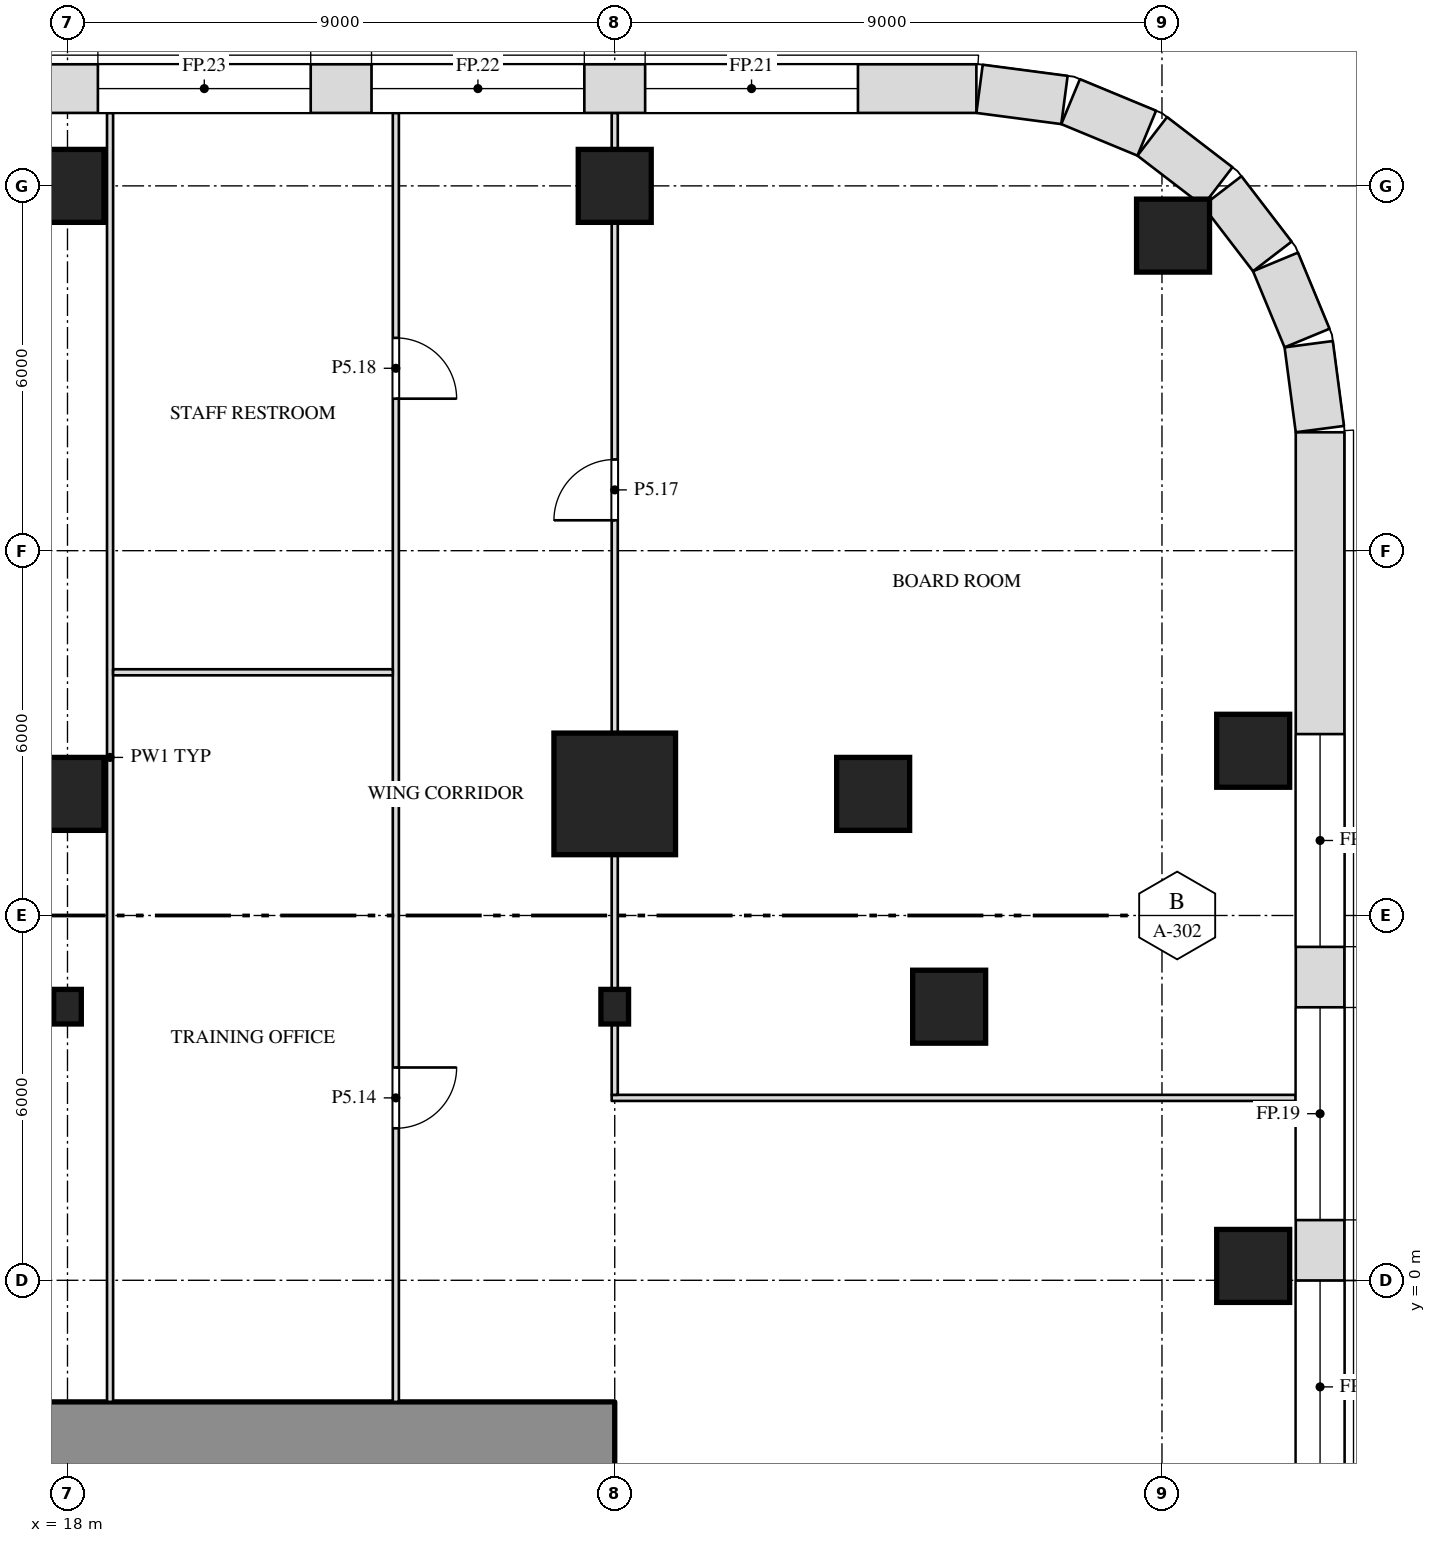
"""IFC4 building model, lengths in metres.
Left out: names, types, materials, properties, quantities, classifications, styles, units other than length and angle.
Written with IfcOpenShell. Run it as: python <this file> out.ifc"""

import sys

from ifc_helpers import new_model, si_unit, direction, frame, frame_2d, origin, origin_2d, place, context, subcontext, project, spatial, rectangle, i_section, extrude, element, fill, save


model = new_model("IFC4")
c1 = context("Model", 3, precision=1e-05, world=origin(), true_north=direction((0.0, 1.0)))
c2 = subcontext(c1, "Body", "Model", "MODEL_VIEW")
j1 = project(units=[si_unit("LENGTHUNIT", "METRE"), si_unit("PLANEANGLEUNIT", "RADIAN")], contexts=[c1])
p1 = place(None, origin())
s1 = spatial("IfcSite", under=j1, at=p1, CompositionType="ELEMENT")
p2 = place(p1, origin())
s2 = spatial("IfcBuilding", under=s1, at=p2, CompositionType="ELEMENT")
p3 = place(p2, frame((0.0, 0.0, 33.0)))
s3 = spatial("IfcBuildingStorey", under=s2, at=p3, CompositionType="ELEMENT", Elevation=33.0)
p4 = place(p3, frame((37.5, 0.236, 0.0), z_axis=(0.0, 0.0, 1.0), x_axis=(1.0, 0.0, 0.0)))
e1 = element("IfcColumn", 1, at=p4, inside=s3, PredefinedType="COLUMN", context=c2, shape_type="SweptSolid", body=[
    extrude(rectangle(XDim=1.2, YDim=1.2, at=origin_2d()), origin(), (0.0, 0.0, 1.0), 6.0),
])
for number, where, z_axis, x_axis in (
    (2, (18.0, 4.5, 0.0), (0.0, 0.0, 1.0), (1.0, 0.0, 0.0)),
    (3, (27.0, 4.5, 0.0), (0.0, 0.0, 1.0), (1.0, 0.0, 0.0)),
):
    element("IfcColumn", number, at=place(p3, frame(where, z_axis=z_axis, x_axis=x_axis)), inside=s3, PredefinedType="COLUMN", context=c2, shape_type="SweptSolid", body=[
        extrude(i_section(OverallWidth=0.455, OverallDepth=0.569, WebThickness=0.078, FlangeThickness=0.125, at=origin_2d()), origin(), (0.0, 0.0, 1.0), 6.0),
    ])
for number, where, z_axis, x_axis in (
    (4, (32.5, 4.5, 0.0), (0.0, 0.0, 1.0), (1.0, 0.0, 0.0)),
    (5, (18.0, 8.0, 0.0), (0.0, 0.0, 1.0), (1.0, 0.0, 0.0)),
):
    element("IfcColumn", number, at=place(p3, frame(where, z_axis=z_axis, x_axis=x_axis)), inside=s3, PredefinedType="COLUMN", context=c2, shape_type="SweptSolid", body=[
        extrude(rectangle(XDim=1.2, YDim=1.2, at=origin_2d()), origin(), (0.0, 0.0, 1.0), 6.0),
    ])
p5 = place(p3, frame((27.0, 8.0, 0.0), z_axis=(0.0, 0.0, 1.0), x_axis=(1.0, 0.0, 0.0)))
e6 = element("IfcColumn", 6, at=p5, inside=s3, PredefinedType="COLUMN", context=c2, shape_type="SweptSolid", body=[
    extrude(rectangle(XDim=2.0, YDim=2.0, at=origin_2d()), origin(), (0.0, 0.0, 1.0), 6.0),
])
for number, where, z_axis, x_axis in (
    (7, (31.25, 8.0, 0.0), (0.0, 0.0, 1.0), (1.0, 0.0, 0.0)),
    (8, (37.5, 8.709, 0.0), (0.0, 0.0, 1.0), (1.0, 0.0, 0.0)),
    (9, (36.182, 17.182, 0.0), (0.0, 0.0, 1.0), (1.0, 0.0, 0.0)),
    (10, (18.0, 18.0, 0.0), (0.0, 0.0, 1.0), (1.0, 0.0, 0.0)),
    (11, (27.0, 18.0, 0.0), (0.0, 0.0, 1.0), (1.0, 0.0, 0.0)),
):
    element("IfcColumn", number, at=place(p3, frame(where, z_axis=z_axis, x_axis=x_axis)), inside=s3, PredefinedType="COLUMN", context=c2, shape_type="SweptSolid", body=[
        extrude(rectangle(XDim=1.2, YDim=1.2, at=origin_2d()), origin(), (0.0, 0.0, 1.0), 6.0),
    ])
p6 = place(p3, frame((-27.0, -2.6, 0.0), z_axis=(0.0, 0.0, 1.0), x_axis=(1.0, 0.0, 0.0)))
e12 = element("IfcWall", 12, at=p6, inside=s3, PredefinedType="SHEAR", context=c2, shape_type="SweptSolid", body=[
    extrude(rectangle(XDim=54.0, YDim=1.2, at=frame_2d((27.0, 0.0))), origin(), (0.0, 0.0, 1.0), 5.75),
])
p7 = place(p3, frame((18.7, -2.0, 0.0), z_axis=(0.0, 0.0, 1.0), x_axis=(0.0, 1.0, 0.0)))
e13 = element("IfcWall", 13, at=p7, inside=s3, PredefinedType="PARTITIONING", context=c2, shape_type="SweptSolid", body=[
    extrude(rectangle(XDim=21.2, YDim=0.1, at=frame_2d((10.6, 0.0))), origin(), (0.0, 0.0, 1.0), 5.75),
])
p8 = place(p3, frame((23.4, -2.0, 0.0), z_axis=(0.0, 0.0, 1.0), x_axis=(0.0, 1.0, 0.0)))
e14 = element("IfcWall", 14, at=p8, inside=s3, PredefinedType="PARTITIONING", context=c2, shape_type="SweptSolid", body=[
    extrude(rectangle(XDim=21.2, YDim=0.1, at=frame_2d((10.6, 0.0))), origin(), (0.0, 0.0, 1.0), 5.75),
])
p9 = place(p8, frame((4.5, 0.0, 0.0)))
e15 = element("IfcOpeningElement", 15, at=p9, cuts=e14, PredefinedType="OPENING", context=c2, shape_type="SweptSolid", body=[
    extrude(rectangle(XDim=1.0, YDim=2.1, at=frame_2d((0.5, 1.05))), frame((0.0, 0.062, 0.0), z_axis=(0.0, -1.0, 0.0), x_axis=(1.0, 0.0, 0.0)), (0.0, 0.0, 1.0), 0.124),
])
p10 = place(p8, frame((16.5, 0.0, 0.0)))
e16 = element("IfcOpeningElement", 16, at=p10, cuts=e14, PredefinedType="OPENING", context=c2, shape_type="SweptSolid", body=[
    extrude(rectangle(XDim=1.0, YDim=2.1, at=frame_2d((0.5, 1.05))), frame((0.0, 0.062, 0.0), z_axis=(0.0, -1.0, 0.0), x_axis=(1.0, 0.0, 0.0)), (0.0, 0.0, 1.0), 0.124),
])
p11 = place(p3, frame((26.95, 3.0, 0.0), z_axis=(0.0, 0.0, 1.0), x_axis=(1.0, 0.0, 0.0)))
e17 = element("IfcWall", 17, at=p11, inside=s3, PredefinedType="PARTITIONING", context=c2, shape_type="SweptSolid", body=[
    extrude(rectangle(XDim=11.25, YDim=0.1, at=frame_2d((5.625, 0.0))), origin(), (0.0, 0.0, 1.0), 5.75),
])
p12 = place(p3, frame((27.0, 3.05, 0.0), z_axis=(0.0, 0.0, 1.0), x_axis=(0.0, 1.0, 0.0)))
e18 = element("IfcWall", 18, at=p12, inside=s3, PredefinedType="PARTITIONING", context=c2, shape_type="SweptSolid", body=[
    extrude(rectangle(XDim=1.166, YDim=0.1, at=frame_2d((0.583, 0.0))), origin(), (0.0, 0.0, 1.0), 5.138),
])
p13 = place(p3, frame((27.0, 4.784, 0.0), z_axis=(0.0, 0.0, 1.0), x_axis=(0.0, 1.0, 0.0)))
e19 = element("IfcWall", 19, at=p13, inside=s3, PredefinedType="PARTITIONING", context=c2, shape_type="SweptSolid", body=[
    extrude(rectangle(XDim=2.216, YDim=0.1, at=frame_2d((1.108, 0.0))), origin(), (0.0, 0.0, 1.0), 5.138),
])
p14 = place(p3, frame((27.0, 9.0, 0.0), z_axis=(0.0, 0.0, 1.0), x_axis=(0.0, 1.0, 0.0)))
e20 = element("IfcWall", 20, at=p14, inside=s3, PredefinedType="PARTITIONING", context=c2, shape_type="SweptSolid", body=[
    extrude(rectangle(XDim=8.4, YDim=0.1, at=frame_2d((4.2, 0.0))), origin(), (0.0, 0.0, 1.0), 5.138),
])
p15 = place(p14, frame((3.5, 0.0, 0.0)))
e21 = element("IfcOpeningElement", 21, at=p15, cuts=e20, PredefinedType="OPENING", context=c2, shape_type="SweptSolid", body=[
    extrude(rectangle(XDim=1.0, YDim=2.1, at=frame_2d((0.5, 1.05))), frame((0.0, 0.062, 0.0), z_axis=(0.0, -1.0, 0.0), x_axis=(1.0, 0.0, 0.0)), (0.0, 0.0, 1.0), 0.124),
])
p16 = place(p3, frame((27.0, 18.6, 0.0), z_axis=(0.0, 0.0, 1.0), x_axis=(0.0, 1.0, 0.0)))
e22 = element("IfcWall", 22, at=p16, inside=s3, PredefinedType="PARTITIONING", context=c2, shape_type="SweptSolid", body=[
    extrude(rectangle(XDim=0.6, YDim=0.1, at=frame_2d((0.3, 0.0))), origin(), (0.0, 0.0, 1.0), 5.75),
])
p17 = place(p3, frame((18.75, 10.0, 0.0), z_axis=(0.0, 0.0, 1.0), x_axis=(1.0, 0.0, 0.0)))
e23 = element("IfcWall", 23, at=p17, inside=s3, PredefinedType="PARTITIONING", context=c2, shape_type="SweptSolid", body=[
    extrude(rectangle(XDim=4.6, YDim=0.1, at=frame_2d((2.3, 0.0))), origin(), (0.0, 0.0, 1.0), 5.75),
])
p18 = place(p3, frame((38.6, -21.948, 0.0), z_axis=(0.0, 0.0, 1.0), x_axis=(0.0, 1.0, 0.0)))
e24 = element("IfcWall", 24, at=p18, inside=s3, PredefinedType="SOLIDWALL", context=c2, shape_type="SweptSolid", body=[
    extrude(rectangle(XDim=35.895, YDim=0.8, at=frame_2d((17.948, 0.0))), origin(), (0.0, 0.0, 1.0), 5.75),
])
p19 = place(p18, frame((4.964, 0.0, 1.0)))
e25 = element("IfcOpeningElement", 25, at=p19, cuts=e24, PredefinedType="OPENING", context=c2, shape_type="SweptSolid", body=[
    extrude(rectangle(XDim=3.5, YDim=4.0, at=frame_2d((1.75, 2.0))), frame((0.0, 0.412, 0.0), z_axis=(0.0, -1.0, 0.0), x_axis=(1.0, 0.0, 0.0)), (0.0, 0.0, 1.0), 0.824),
])
p20 = place(p18, frame((9.458, 0.0, 1.0)))
e26 = element("IfcOpeningElement", 26, at=p20, cuts=e24, PredefinedType="OPENING", context=c2, shape_type="SweptSolid", body=[
    extrude(rectangle(XDim=3.5, YDim=4.0, at=frame_2d((1.75, 2.0))), frame((0.0, 0.412, 0.0), z_axis=(0.0, -1.0, 0.0), x_axis=(1.0, 0.0, 0.0)), (0.0, 0.0, 1.0), 0.824),
])
p21 = place(p18, frame((13.951, 0.0, 1.0)))
e27 = element("IfcOpeningElement", 27, at=p21, cuts=e24, PredefinedType="OPENING", context=c2, shape_type="SweptSolid", body=[
    extrude(rectangle(XDim=3.5, YDim=4.0, at=frame_2d((1.75, 2.0))), frame((0.0, 0.412, 0.0), z_axis=(0.0, -1.0, 0.0), x_axis=(1.0, 0.0, 0.0)), (0.0, 0.0, 1.0), 0.824),
])
p22 = place(p18, frame((18.444, 0.0, 1.0)))
e28 = element("IfcOpeningElement", 28, at=p22, cuts=e24, PredefinedType="OPENING", context=c2, shape_type="SweptSolid", body=[
    extrude(rectangle(XDim=3.5, YDim=4.0, at=frame_2d((1.75, 2.0))), frame((0.0, 0.412, 0.0), z_axis=(0.0, -1.0, 0.0), x_axis=(1.0, 0.0, 0.0)), (0.0, 0.0, 1.0), 0.824),
])
p23 = place(p18, frame((22.938, 0.0, 1.0)))
e29 = element("IfcOpeningElement", 29, at=p23, cuts=e24, PredefinedType="OPENING", context=c2, shape_type="SweptSolid", body=[
    extrude(rectangle(XDim=3.5, YDim=4.0, at=frame_2d((1.75, 2.0))), frame((0.0, 0.412, 0.0), z_axis=(0.0, -1.0, 0.0), x_axis=(1.0, 0.0, 0.0)), (0.0, 0.0, 1.0), 0.824),
])
p24 = place(p18, frame((27.431, 0.0, 1.0)))
e30 = element("IfcOpeningElement", 30, at=p24, cuts=e24, PredefinedType="OPENING", context=c2, shape_type="SweptSolid", body=[
    extrude(rectangle(XDim=3.5, YDim=4.0, at=frame_2d((1.75, 2.0))), frame((0.0, 0.412, 0.0), z_axis=(0.0, -1.0, 0.0), x_axis=(1.0, 0.0, 0.0)), (0.0, 0.0, 1.0), 0.824),
])
p25 = place(p3, frame((38.597, 14.0, 0.0), z_axis=(0.0, 0.0, 1.0), x_axis=(-0.130517283865, 0.99144603414, 0.0)))
e31 = element("IfcWall", 31, at=p25, inside=s3, PredefinedType="SOLIDWALL", context=c2, shape_type="SweptSolid", body=[
    extrude(rectangle(XDim=1.408, YDim=0.8, at=frame_2d((0.704, 0.0))), origin(), (0.0, 0.0, 1.0), 5.75),
])
p26 = place(p3, frame((38.386, 15.497, 0.0), z_axis=(0.0, 0.0, 1.0), x_axis=(-0.38276009378, 0.923847774587, 0.0)))
e32 = element("IfcWall", 32, at=p26, inside=s3, PredefinedType="SOLIDWALL", context=c2, shape_type="SweptSolid", body=[
    extrude(rectangle(XDim=1.355, YDim=0.8, at=frame_2d((0.678, 0.0))), origin(), (0.0, 0.0, 1.0), 5.75),
])
for number, where, z_axis, x_axis in (
    (33, (37.815, 16.84, 0.0), (0.0, 0.0, 1.0), (-0.609, 0.793, 0.0)),
    (34, (36.916, 17.989, 0.0), (0.0, 0.0, 1.0), (-0.793, 0.609, 0.0)),
):
    element("IfcWall", number, at=place(p3, frame(where, z_axis=z_axis, x_axis=x_axis)), inside=s3, PredefinedType="SOLIDWALL", context=c2, shape_type="SweptSolid", body=[
        extrude(rectangle(XDim=1.356, YDim=0.8, at=frame_2d((0.678, 0.0))), origin(), (0.0, 0.0, 1.0), 5.75),
    ])
p27 = place(p3, frame((35.75, 18.867, 0.0), z_axis=(0.0, 0.0, 1.0), x_axis=(-0.923847774587, 0.38276009378, 0.0)))
e35 = element("IfcWall", 35, at=p27, inside=s3, PredefinedType="SOLIDWALL", context=c2, shape_type="SweptSolid", body=[
    extrude(rectangle(XDim=1.355, YDim=0.8, at=frame_2d((0.678, 0.0))), origin(), (0.0, 0.0, 1.0), 5.75),
])
p28 = place(p3, frame((34.396, 19.413, 0.0), z_axis=(0.0, 0.0, 1.0), x_axis=(-0.99144603414, 0.130517283865, 0.0)))
e36 = element("IfcWall", 36, at=p28, inside=s3, PredefinedType="SOLIDWALL", context=c2, shape_type="SweptSolid", body=[
    extrude(rectangle(XDim=1.408, YDim=0.8, at=frame_2d((0.704, 0.0))), origin(), (0.0, 0.0, 1.0), 5.75),
])
p29 = place(p3, frame((32.948, 19.6, 0.0), z_axis=(0.0, 0.0, 1.0), x_axis=(-1.0, 0.0, 0.0)))
e37 = element("IfcWall", 37, at=p29, inside=s3, PredefinedType="SOLIDWALL", context=c2, shape_type="SweptSolid", body=[
    extrude(rectangle(XDim=65.895, YDim=0.8, at=frame_2d((32.948, 0.0))), origin(), (0.0, 0.0, 1.0), 5.75),
])
p30 = place(p29, frame((1.948, 0.0, 1.0)))
e38 = element("IfcOpeningElement", 38, at=p30, cuts=e37, PredefinedType="OPENING", context=c2, shape_type="SweptSolid", body=[
    extrude(rectangle(XDim=3.5, YDim=4.0, at=frame_2d((1.75, 2.0))), frame((0.0, 0.412, 0.0), z_axis=(0.0, -1.0, 0.0), x_axis=(1.0, 0.0, 0.0)), (0.0, 0.0, 1.0), 0.824),
])
p31 = place(p29, frame((6.448, 0.0, 1.0)))
e39 = element("IfcOpeningElement", 39, at=p31, cuts=e37, PredefinedType="OPENING", context=c2, shape_type="SweptSolid", body=[
    extrude(rectangle(XDim=3.5, YDim=4.0, at=frame_2d((1.75, 2.0))), frame((0.0, 0.412, 0.0), z_axis=(0.0, -1.0, 0.0), x_axis=(1.0, 0.0, 0.0)), (0.0, 0.0, 1.0), 0.824),
])
p32 = place(p29, frame((10.948, 0.0, 1.0)))
e40 = element("IfcOpeningElement", 40, at=p32, cuts=e37, PredefinedType="OPENING", context=c2, shape_type="SweptSolid", body=[
    extrude(rectangle(XDim=3.5, YDim=4.0, at=frame_2d((1.75, 2.0))), frame((0.0, 0.412, 0.0), z_axis=(0.0, -1.0, 0.0), x_axis=(1.0, 0.0, 0.0)), (0.0, 0.0, 1.0), 0.824),
])
p33 = place(p29, frame((51.448, 0.0, 1.0)))
e41 = element("IfcOpeningElement", 41, at=p33, cuts=e37, PredefinedType="OPENING", context=c2, shape_type="SweptSolid", body=[
    extrude(rectangle(XDim=3.5, YDim=4.0, at=frame_2d((1.75, 2.0))), frame((0.0, 0.412, 0.0), z_axis=(0.0, -1.0, 0.0), x_axis=(1.0, 0.0, 0.0)), (0.0, 0.0, 1.0), 0.824),
])
p34 = place(p29, frame((55.948, 0.0, 1.0)))
e42 = element("IfcOpeningElement", 42, at=p34, cuts=e37, PredefinedType="OPENING", context=c2, shape_type="SweptSolid", body=[
    extrude(rectangle(XDim=3.5, YDim=4.0, at=frame_2d((1.75, 2.0))), frame((0.0, 0.412, 0.0), z_axis=(0.0, -1.0, 0.0), x_axis=(1.0, 0.0, 0.0)), (0.0, 0.0, 1.0), 0.824),
])
p35 = place(p29, frame((60.448, 0.0, 1.0)))
e43 = element("IfcOpeningElement", 43, at=p35, cuts=e37, PredefinedType="OPENING", context=c2, shape_type="SweptSolid", body=[
    extrude(rectangle(XDim=3.5, YDim=4.0, at=frame_2d((1.75, 2.0))), frame((0.0, 0.412, 0.0), z_axis=(0.0, -1.0, 0.0), x_axis=(1.0, 0.0, 0.0)), (0.0, 0.0, 1.0), 0.824),
])
p36 = place(p9, origin())
e44 = element("IfcDoor", 44, at=p36, inside=s3, OperationType="SINGLE_SWING_LEFT", PredefinedType="DOOR", context=c2, shape_type="SweptSolid", body=[
    extrude(rectangle(XDim=1.0, YDim=2.1, at=frame_2d((0.5, 1.05))), frame((0.0, 0.025, 0.0), z_axis=(0.0, -1.0, 0.0), x_axis=(1.0, 0.0, 0.0)), (0.0, 0.0, 1.0), 0.05),
])
fill(e15, e44)
p37 = place(p15, origin())
e45 = element("IfcDoor", 45, at=p37, inside=s3, OperationType="SINGLE_SWING_LEFT", PredefinedType="DOOR", context=c2, shape_type="SweptSolid", body=[
    extrude(rectangle(XDim=1.0, YDim=2.1, at=frame_2d((0.5, 1.05))), frame((0.0, 0.025, 0.0), z_axis=(0.0, -1.0, 0.0), x_axis=(1.0, 0.0, 0.0)), (0.0, 0.0, 1.0), 0.05),
])
fill(e21, e45)
p38 = place(p10, origin())
e46 = element("IfcDoor", 46, at=p38, inside=s3, OperationType="SINGLE_SWING_RIGHT", PredefinedType="DOOR", context=c2, shape_type="SweptSolid", body=[
    extrude(rectangle(XDim=1.0, YDim=2.1, at=frame_2d((0.5, 1.05))), frame((0.0, 0.025, 0.0), z_axis=(0.0, -1.0, 0.0), x_axis=(1.0, 0.0, 0.0)), (0.0, 0.0, 1.0), 0.05),
])
fill(e16, e46)
p39 = place(p22, origin())
e47 = element("IfcWindow", 47, at=p39, inside=s3, PartitioningType="SINGLE_PANEL", PredefinedType="WINDOW", context=c2, shape_type="SweptSolid", body=[
    extrude(rectangle(XDim=3.5, YDim=4.0, at=frame_2d((1.75, 2.0))), frame((0.0, 0.03, 0.0), z_axis=(0.0, -1.0, 0.0), x_axis=(1.0, 0.0, 0.0)), (0.0, 0.0, 1.0), 0.06),
])
fill(e28, e47)
p40 = place(p23, origin())
e48 = element("IfcWindow", 48, at=p40, inside=s3, PartitioningType="SINGLE_PANEL", PredefinedType="WINDOW", context=c2, shape_type="SweptSolid", body=[
    extrude(rectangle(XDim=3.5, YDim=4.0, at=frame_2d((1.75, 2.0))), frame((0.0, 0.03, 0.0), z_axis=(0.0, -1.0, 0.0), x_axis=(1.0, 0.0, 0.0)), (0.0, 0.0, 1.0), 0.06),
])
fill(e29, e48)
p41 = place(p24, origin())
e49 = element("IfcWindow", 49, at=p41, inside=s3, PartitioningType="SINGLE_PANEL", PredefinedType="WINDOW", context=c2, shape_type="SweptSolid", body=[
    extrude(rectangle(XDim=3.5, YDim=4.0, at=frame_2d((1.75, 2.0))), frame((0.0, 0.03, 0.0), z_axis=(0.0, -1.0, 0.0), x_axis=(1.0, 0.0, 0.0)), (0.0, 0.0, 1.0), 0.06),
])
fill(e30, e49)
p42 = place(p30, origin())
e50 = element("IfcWindow", 50, at=p42, inside=s3, PartitioningType="SINGLE_PANEL", PredefinedType="WINDOW", context=c2, shape_type="SweptSolid", body=[
    extrude(rectangle(XDim=3.5, YDim=4.0, at=frame_2d((1.75, 2.0))), frame((0.0, 0.03, 0.0), z_axis=(0.0, -1.0, 0.0), x_axis=(1.0, 0.0, 0.0)), (0.0, 0.0, 1.0), 0.06),
])
fill(e38, e50)
p43 = place(p31, origin())
e51 = element("IfcWindow", 51, at=p43, inside=s3, PartitioningType="SINGLE_PANEL", PredefinedType="WINDOW", context=c2, shape_type="SweptSolid", body=[
    extrude(rectangle(XDim=3.5, YDim=4.0, at=frame_2d((1.75, 2.0))), frame((0.0, 0.03, 0.0), z_axis=(0.0, -1.0, 0.0), x_axis=(1.0, 0.0, 0.0)), (0.0, 0.0, 1.0), 0.06),
])
fill(e39, e51)
p44 = place(p32, origin())
e52 = element("IfcWindow", 52, at=p44, inside=s3, PartitioningType="SINGLE_PANEL", PredefinedType="WINDOW", context=c2, shape_type="SweptSolid", body=[
    extrude(rectangle(XDim=3.5, YDim=4.0, at=frame_2d((1.75, 2.0))), frame((0.0, 0.03, 0.0), z_axis=(0.0, -1.0, 0.0), x_axis=(1.0, 0.0, 0.0)), (0.0, 0.0, 1.0), 0.06),
])
fill(e40, e52)
save(model, sys.argv[1])
